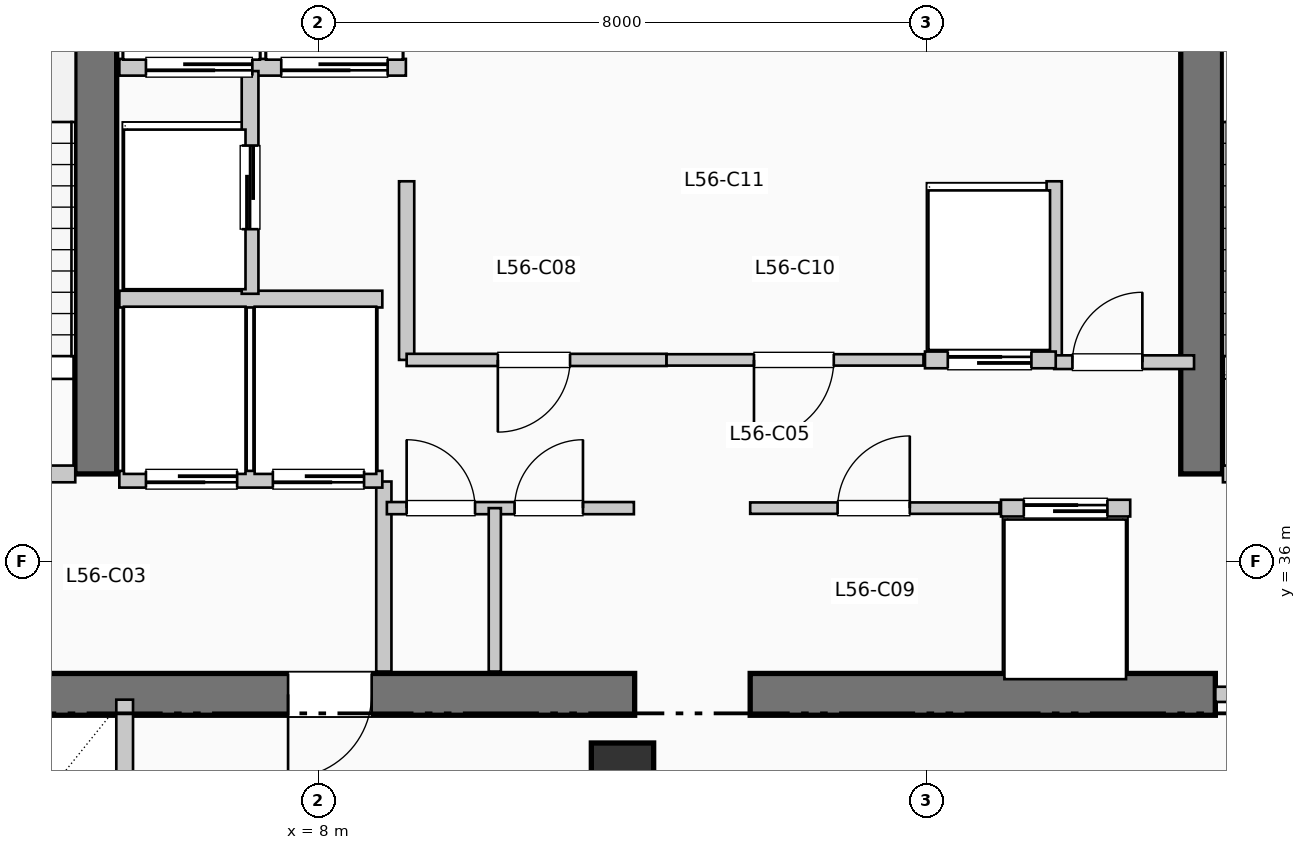
"""IFC4 building model, lengths in metres.
Left out: names, types, materials, properties, quantities, classifications, styles, units other than length and angle.
Written with IfcOpenShell. Run it as: python <this file> out.ifc"""

import sys

from ifc_helpers import new_model, si_unit, direction, frame, frame_2d, origin, origin_2d, place, context, subcontext, project, spatial, rectangle, extrude, element, fill, save


model = new_model("IFC4")
c1 = context("Model", 3, precision=1e-05, world=origin(), true_north=direction((0.0, 1.0)))
c2 = subcontext(c1, "Body", "Model", "MODEL_VIEW")
j1 = project(units=[si_unit("LENGTHUNIT", "METRE"), si_unit("PLANEANGLEUNIT", "RADIAN")], contexts=[c1])
p1 = place(None, origin())
s1 = spatial("IfcSite", under=j1, at=p1, CompositionType="ELEMENT")
p2 = place(p1, origin())
s2 = spatial("IfcBuilding", under=s1, at=p2, CompositionType="ELEMENT")
p3 = place(p2, frame((0.0, 0.0, 231.66)))
s3 = spatial("IfcBuildingStorey", under=s2, at=p3, CompositionType="ELEMENT", Elevation=231.66)
p4 = place(p3, frame((1.45, 34.25, 0.0), z_axis=(0.0, 0.0, 1.0), x_axis=(1.0, 0.0, 0.0)))
e1 = element("IfcWall", 1, at=p4, inside=s3, PredefinedType="SHEAR", context=c2, shape_type="SweptSolid", body=[
    extrude(rectangle(XDim=10.71, YDim=0.55, at=frame_2d((5.355, 0.0))), origin(), (0.0, 0.0, 1.0), 3.96),
])
p5 = place(p4, frame((7.25, 0.0, 0.0), z_axis=(0.0, 0.0, 1.0), x_axis=(-1.0, 0.0, 0.0)))
e2 = element("IfcOpeningElement", 2, at=p5, cuts=e1, PredefinedType="OPENING", context=c2, shape_type="SweptSolid", body=[
    extrude(rectangle(XDim=1.1, YDim=2.15, at=frame_2d((0.55, 1.075))), frame((0.0, 0.285, 0.0), z_axis=(0.0, -1.0, 0.0), x_axis=(1.0, 0.0, 0.0)), (0.0, 0.0, 1.0), 0.57),
])
p6 = place(p3, frame((13.68, 34.25, 0.0), z_axis=(0.0, 0.0, 1.0), x_axis=(1.0, 0.0, 0.0)))
e3 = element("IfcWall", 3, at=p6, inside=s3, PredefinedType="SHEAR", context=c2, shape_type="SweptSolid", body=[
    extrude(rectangle(XDim=6.12, YDim=0.55, at=frame_2d((3.06, 0.0))), origin(), (0.0, 0.0, 1.0), 3.96),
])
for number, where, z_axis, x_axis in (
    (4, (5.07, 37.15, 0.0), (0.0, 0.0, 1.0), (0.0, 1.0, 0.0)),
    (5, (19.62, 37.15, 0.0), (0.0, 0.0, 1.0), (0.0, 1.0, 0.0)),
):
    element("IfcWall", number, at=place(p3, frame(where, z_axis=z_axis, x_axis=x_axis)), inside=s3, PredefinedType="SHEAR", context=c2, shape_type="SweptSolid", body=[
        extrude(rectangle(XDim=7.89, YDim=0.55, at=frame_2d((3.945, 0.0))), origin(), (0.0, 0.0, 1.0), 3.96),
    ])
p7 = place(p3, frame((12.0, 33.2, 0.0), z_axis=(0.0, 0.0, 1.0), x_axis=(1.0, 0.0, 0.0)))
e6 = element("IfcColumn", 6, at=p7, inside=s3, PredefinedType="COLUMN", context=c2, shape_type="SweptSolid", body=[
    extrude(rectangle(XDim=0.82, YDim=0.82, at=origin_2d()), origin(), (0.0, 0.0, 1.0), 3.96),
])
p8 = place(p3, frame((1.65, 37.15, 0.0), z_axis=(0.0, 0.0, 1.0), x_axis=(1.0, 0.0, 0.0)))
e7 = element("IfcWall", 7, at=p8, inside=s3, PredefinedType="PARTITIONING", context=c2, shape_type="SweptSolid", body=[
    extrude(rectangle(XDim=3.15, YDim=0.22, at=frame_2d((1.575, 0.0))), origin(), (0.0, 0.0, 1.0), 3.71),
])
p9 = place(p8, frame((2.05, 0.0, 0.0), z_axis=(0.0, 0.0, 1.0), x_axis=(-1.0, 0.0, 0.0)))
e8 = element("IfcOpeningElement", 8, at=p9, cuts=e7, PredefinedType="OPENING", context=c2, shape_type="SweptSolid", body=[
    extrude(rectangle(XDim=1.05, YDim=2.15, at=frame_2d((0.525, 1.075))), frame((0.0, 0.12, 0.0), z_axis=(0.0, -1.0, 0.0), x_axis=(1.0, 0.0, 0.0)), (0.0, 0.0, 1.0), 0.24),
])
p10 = place(p3, frame((8.86, 34.55, 0.0), z_axis=(0.0, 0.0, 1.0), x_axis=(0.0, 1.0, 0.0)))
e9 = element("IfcWall", 9, at=p10, inside=s3, PredefinedType="PARTITIONING", context=c2, shape_type="SweptSolid", body=[
    extrude(rectangle(XDim=2.5, YDim=0.2, at=frame_2d((1.25, 0.0))), origin(), (0.0, 0.0, 1.0), 3.71),
])
p11 = place(p3, frame((19.9, 37.15, 0.0), z_axis=(0.0, 0.0, 1.0), x_axis=(1.0, 0.0, 0.0)))
e10 = element("IfcWall", 10, at=p11, inside=s3, PredefinedType="PARTITIONING", context=c2, shape_type="SweptSolid", body=[
    extrude(rectangle(XDim=3.15, YDim=0.22, at=frame_2d((1.575, 0.0))), origin(), (0.0, 0.0, 1.0), 3.71),
])
p12 = place(p11, frame((2.05, 0.0, 0.0), z_axis=(0.0, 0.0, 1.0), x_axis=(-1.0, 0.0, 0.0)))
e11 = element("IfcOpeningElement", 11, at=p12, cuts=e10, PredefinedType="OPENING", context=c2, shape_type="SweptSolid", body=[
    extrude(rectangle(XDim=1.05, YDim=2.15, at=frame_2d((0.525, 1.075))), frame((0.0, 0.12, 0.0), z_axis=(0.0, -1.0, 0.0), x_axis=(1.0, 0.0, 0.0)), (0.0, 0.0, 1.0), 0.24),
])
p13 = place(p3, frame((19.8, 34.25, 0.0), z_axis=(0.0, 0.0, 1.0), x_axis=(1.0, 0.0, 0.0)))
e12 = element("IfcWall", 12, at=p13, inside=s3, PredefinedType="PARTITIONING", context=c2, shape_type="SweptSolid", body=[
    extrude(rectangle(XDim=3.25, YDim=0.2, at=frame_2d((1.625, 0.0))), origin(), (0.0, 0.0, 1.0), 3.71),
])
p14 = place(p13, frame((2.15, 0.0, 0.0), z_axis=(0.0, 0.0, 1.0), x_axis=(-1.0, 0.0, 0.0)))
e13 = element("IfcOpeningElement", 13, at=p14, cuts=e12, PredefinedType="OPENING", context=c2, shape_type="SweptSolid", body=[
    extrude(rectangle(XDim=1.1, YDim=2.15, at=frame_2d((0.55, 1.075))), frame((0.0, 0.11, 0.0), z_axis=(0.0, -1.0, 0.0), x_axis=(1.0, 0.0, 0.0)), (0.0, 0.0, 1.0), 0.22),
])
p15 = place(p3, frame((5.38, 37.08, 0.0), z_axis=(0.0, 0.0, 1.0), x_axis=(1.0, 0.0, 0.0)))
e14 = element("IfcWall", 14, at=p15, inside=s3, PredefinedType="PARTITIONING", context=c2, shape_type="SweptSolid", body=[
    extrude(rectangle(XDim=3.46, YDim=0.22, at=frame_2d((1.73, 0.0))), origin(), (0.0, 0.0, 1.0), 3.71),
])
p16 = place(p15, frame((1.55, 0.0, 0.0), z_axis=(0.0, 0.0, 1.0), x_axis=(-1.0, 0.0, 0.0)))
e15 = element("IfcOpeningElement", 15, at=p16, cuts=e14, PredefinedType="OPENING", context=c2, shape_type="SweptSolid", body=[
    extrude(rectangle(XDim=1.2, YDim=2.2, at=frame_2d((0.6, 1.1))), frame((0.0, 0.12, 0.0), z_axis=(0.0, -1.0, 0.0), x_axis=(1.0, 0.0, 0.0)), (0.0, 0.0, 1.0), 0.24),
])
p17 = place(p15, frame((3.22, 0.0, 0.0), z_axis=(0.0, 0.0, 1.0), x_axis=(-1.0, 0.0, 0.0)))
e16 = element("IfcOpeningElement", 16, at=p17, cuts=e14, PredefinedType="OPENING", context=c2, shape_type="SweptSolid", body=[
    extrude(rectangle(XDim=1.2, YDim=2.2, at=frame_2d((0.6, 1.1))), frame((0.0, 0.12, 0.0), z_axis=(0.0, -1.0, 0.0), x_axis=(1.0, 0.0, 0.0)), (0.0, 0.0, 1.0), 0.24),
])
p18 = place(p3, frame((5.38, 39.45, 0.0), z_axis=(0.0, 0.0, 1.0), x_axis=(1.0, 0.0, 0.0)))
e17 = element("IfcWall", 17, at=p18, inside=s3, PredefinedType="PARTITIONING", context=c2, shape_type="SweptSolid", body=[
    extrude(rectangle(XDim=3.46, YDim=0.22, at=frame_2d((1.73, 0.0))), origin(), (0.0, 0.0, 1.0), 3.71),
])
p19 = place(p3, frame((5.38, 42.5, 0.0), z_axis=(0.0, 0.0, 1.0), x_axis=(1.0, 0.0, 0.0)))
e18 = element("IfcWall", 18, at=p19, inside=s3, PredefinedType="PARTITIONING", context=c2, shape_type="SweptSolid", body=[
    extrude(rectangle(XDim=3.77, YDim=0.22, at=frame_2d((1.885, 0.0))), origin(), (0.0, 0.0, 1.0), 3.71),
])
p20 = place(p19, frame((1.75, 0.0, 0.0), z_axis=(0.0, 0.0, 1.0), x_axis=(-1.0, 0.0, 0.0)))
e19 = element("IfcOpeningElement", 19, at=p20, cuts=e18, PredefinedType="OPENING", context=c2, shape_type="SweptSolid", body=[
    extrude(rectangle(XDim=1.4, YDim=2.2, at=frame_2d((0.7, 1.1))), frame((0.0, 0.12, 0.0), z_axis=(0.0, -1.0, 0.0), x_axis=(1.0, 0.0, 0.0)), (0.0, 0.0, 1.0), 0.24),
])
p21 = place(p19, frame((3.53, 0.0, 0.0), z_axis=(0.0, 0.0, 1.0), x_axis=(-1.0, 0.0, 0.0)))
e20 = element("IfcOpeningElement", 20, at=p21, cuts=e18, PredefinedType="OPENING", context=c2, shape_type="SweptSolid", body=[
    extrude(rectangle(XDim=1.4, YDim=2.2, at=frame_2d((0.7, 1.1))), frame((0.0, 0.12, 0.0), z_axis=(0.0, -1.0, 0.0), x_axis=(1.0, 0.0, 0.0)), (0.0, 0.0, 1.0), 0.24),
])
p22 = place(p3, frame((7.1, 39.52, 0.0), z_axis=(0.0, 0.0, 1.0), x_axis=(0.0, 1.0, 0.0)))
e21 = element("IfcWall", 21, at=p22, inside=s3, PredefinedType="PARTITIONING", context=c2, shape_type="SweptSolid", body=[
    extrude(rectangle(XDim=2.93, YDim=0.22, at=frame_2d((1.465, 0.0))), origin(), (0.0, 0.0, 1.0), 3.71),
])
p23 = place(p22, frame((0.85, 0.0, 0.0)))
e22 = element("IfcOpeningElement", 22, at=p23, cuts=e21, PredefinedType="OPENING", context=c2, shape_type="SweptSolid", body=[
    extrude(rectangle(XDim=1.1, YDim=2.2, at=frame_2d((0.55, 1.1))), frame((0.0, 0.12, 0.0), z_axis=(0.0, -1.0, 0.0), x_axis=(1.0, 0.0, 0.0)), (0.0, 0.0, 1.0), 0.24),
])
p24 = place(p3, frame((5.45, 31.8, 0.0), z_axis=(0.0, 0.0, 1.0), x_axis=(0.0, 1.0, 0.0)))
e23 = element("IfcWall", 23, at=p24, inside=s3, PredefinedType="PARTITIONING", context=c2, shape_type="SweptSolid", body=[
    extrude(rectangle(XDim=2.38, YDim=0.22, at=frame_2d((1.19, 0.0))), origin(), (0.0, 0.0, 1.0), 3.71),
])
for number, where, z_axis, x_axis in (
    (24, (9.16, 38.65, 0.0), (0.0, 0.0, 1.0), (0.0, 1.0, 0.0)),
    (25, (17.68, 38.65, 0.0), (0.0, 0.0, 1.0), (0.0, 1.0, 0.0)),
):
    element("IfcWall", number, at=place(p3, frame(where, z_axis=z_axis, x_axis=x_axis)), inside=s3, PredefinedType="PARTITIONING", context=c2, shape_type="SweptSolid", body=[
        extrude(rectangle(XDim=2.35, YDim=0.2, at=frame_2d((1.175, 0.0))), origin(), (0.0, 0.0, 1.0), 3.71),
    ])
p25 = place(p3, frame((17.68, 38.62, 0.0), z_axis=(0.0, 0.0, 1.0), x_axis=(1.0, 0.0, 0.0)))
e26 = element("IfcWall", 26, at=p25, inside=s3, PredefinedType="PARTITIONING", context=c2, shape_type="SweptSolid", body=[
    extrude(rectangle(XDim=1.84, YDim=0.18, at=frame_2d((0.92, 0.0))), origin(), (0.0, 0.0, 1.0), 3.71),
])
p26 = place(p25, frame((0.24, 0.0, 0.0)))
e27 = element("IfcOpeningElement", 27, at=p26, cuts=e26, PredefinedType="OPENING", context=c2, shape_type="SweptSolid", body=[
    extrude(rectangle(XDim=0.92, YDim=2.1, at=frame_2d((0.46, 1.05))), frame((0.0, 0.1, 0.0), z_axis=(0.0, -1.0, 0.0), x_axis=(1.0, 0.0, 0.0)), (0.0, 0.0, 1.0), 0.2),
])
p27 = place(p3, frame((8.9, 36.7, 0.0), z_axis=(0.0, 0.0, 1.0), x_axis=(1.0, 0.0, 0.0)))
e28 = element("IfcWall", 28, at=p27, inside=s3, PredefinedType="PARTITIONING", context=c2, shape_type="SweptSolid", body=[
    extrude(rectangle(XDim=3.25, YDim=0.16, at=frame_2d((1.625, 0.0))), origin(), (0.0, 0.0, 1.0), 3.71),
])
p28 = place(p27, frame((0.26, 0.0, 0.0)))
e29 = element("IfcOpeningElement", 29, at=p28, cuts=e28, PredefinedType="OPENING", context=c2, shape_type="SweptSolid", body=[
    extrude(rectangle(XDim=0.9, YDim=2.15, at=frame_2d((0.45, 1.075))), frame((0.0, 0.09, 0.0), z_axis=(0.0, -1.0, 0.0), x_axis=(1.0, 0.0, 0.0)), (0.0, 0.0, 1.0), 0.18),
])
p29 = place(p27, frame((1.68, 0.0, 0.0)))
e30 = element("IfcOpeningElement", 30, at=p29, cuts=e28, PredefinedType="OPENING", context=c2, shape_type="SweptSolid", body=[
    extrude(rectangle(XDim=0.9, YDim=2.15, at=frame_2d((0.45, 1.075))), frame((0.0, 0.09, 0.0), z_axis=(0.0, -1.0, 0.0), x_axis=(1.0, 0.0, 0.0)), (0.0, 0.0, 1.0), 0.18),
])
p30 = place(p3, frame((10.32, 34.55, 0.0), z_axis=(0.0, 0.0, 1.0), x_axis=(0.0, 1.0, 0.0)))
e31 = element("IfcWall", 31, at=p30, inside=s3, PredefinedType="PARTITIONING", context=c2, shape_type="SweptSolid", body=[
    extrude(rectangle(XDim=2.15, YDim=0.16, at=frame_2d((1.075, 0.0))), origin(), (0.0, 0.0, 1.0), 3.71),
])
p31 = place(p3, frame((9.16, 38.65, 0.0), z_axis=(0.0, 0.0, 1.0), x_axis=(1.0, 0.0, 0.0)))
e32 = element("IfcWall", 32, at=p31, inside=s3, PredefinedType="PARTITIONING", context=c2, shape_type="SweptSolid", body=[
    extrude(rectangle(XDim=3.42, YDim=0.16, at=frame_2d((1.71, 0.0))), origin(), (0.0, 0.0, 1.0), 3.71),
])
p32 = place(p31, frame((2.15, 0.0, 0.0), z_axis=(0.0, 0.0, 1.0), x_axis=(-1.0, 0.0, 0.0)))
e33 = element("IfcOpeningElement", 33, at=p32, cuts=e32, PredefinedType="OPENING", context=c2, shape_type="SweptSolid", body=[
    extrude(rectangle(XDim=0.95, YDim=2.15, at=frame_2d((0.475, 1.075))), frame((0.0, 0.09, 0.0), z_axis=(0.0, -1.0, 0.0), x_axis=(1.0, 0.0, 0.0)), (0.0, 0.0, 1.0), 0.18),
])
p33 = place(p3, frame((13.68, 36.7, 0.0), z_axis=(0.0, 0.0, 1.0), x_axis=(1.0, 0.0, 0.0)))
e34 = element("IfcWall", 34, at=p33, inside=s3, PredefinedType="PARTITIONING", context=c2, shape_type="SweptSolid", body=[
    extrude(rectangle(XDim=3.28, YDim=0.15, at=frame_2d((1.64, 0.0))), origin(), (0.0, 0.0, 1.0), 3.71),
])
p34 = place(p33, frame((1.15, 0.0, 0.0)))
e35 = element("IfcOpeningElement", 35, at=p34, cuts=e34, PredefinedType="OPENING", context=c2, shape_type="SweptSolid", body=[
    extrude(rectangle(XDim=0.95, YDim=2.15, at=frame_2d((0.475, 1.075))), frame((0.0, 0.085, 0.0), z_axis=(0.0, -1.0, 0.0), x_axis=(1.0, 0.0, 0.0)), (0.0, 0.0, 1.0), 0.17),
])
p35 = place(p3, frame((12.58, 38.65, 0.0), z_axis=(0.0, 0.0, 1.0), x_axis=(1.0, 0.0, 0.0)))
e36 = element("IfcWall", 36, at=p35, inside=s3, PredefinedType="PARTITIONING", context=c2, shape_type="SweptSolid", body=[
    extrude(rectangle(XDim=3.38, YDim=0.15, at=frame_2d((1.69, 0.0))), origin(), (0.0, 0.0, 1.0), 3.71),
])
p36 = place(p35, frame((2.2, 0.0, 0.0), z_axis=(0.0, 0.0, 1.0), x_axis=(-1.0, 0.0, 0.0)))
e37 = element("IfcOpeningElement", 37, at=p36, cuts=e36, PredefinedType="OPENING", context=c2, shape_type="SweptSolid", body=[
    extrude(rectangle(XDim=1.05, YDim=2.15, at=frame_2d((0.525, 1.075))), frame((0.0, 0.085, 0.0), z_axis=(0.0, -1.0, 0.0), x_axis=(1.0, 0.0, 0.0)), (0.0, 0.0, 1.0), 0.17),
])
p37 = place(p3, frame((16.98, 36.7, 0.0), z_axis=(0.0, 0.0, 1.0), x_axis=(1.0, 0.0, 0.0)))
e38 = element("IfcWall", 38, at=p37, inside=s3, PredefinedType="PARTITIONING", context=c2, shape_type="SweptSolid", body=[
    extrude(rectangle(XDim=1.7, YDim=0.22, at=frame_2d((0.85, 0.0))), origin(), (0.0, 0.0, 1.0), 3.71),
])
p38 = place(p37, frame((0.3, 0.0, 0.0)))
e39 = element("IfcOpeningElement", 39, at=p38, cuts=e38, PredefinedType="OPENING", context=c2, shape_type="SweptSolid", body=[
    extrude(rectangle(XDim=1.1, YDim=2.2, at=frame_2d((0.55, 1.1))), frame((0.0, 0.12, 0.0), z_axis=(0.0, -1.0, 0.0), x_axis=(1.0, 0.0, 0.0)), (0.0, 0.0, 1.0), 0.24),
])
p39 = place(p3, frame((15.98, 38.65, 0.0), z_axis=(0.0, 0.0, 1.0), x_axis=(1.0, 0.0, 0.0)))
e40 = element("IfcWall", 40, at=p39, inside=s3, PredefinedType="PARTITIONING", context=c2, shape_type="SweptSolid", body=[
    extrude(rectangle(XDim=1.72, YDim=0.22, at=frame_2d((0.86, 0.0))), origin(), (0.0, 0.0, 1.0), 3.71),
])
p40 = place(p39, frame((0.3, 0.0, 0.0)))
e41 = element("IfcOpeningElement", 41, at=p40, cuts=e40, PredefinedType="OPENING", context=c2, shape_type="SweptSolid", body=[
    extrude(rectangle(XDim=1.1, YDim=2.2, at=frame_2d((0.55, 1.1))), frame((0.0, 0.12, 0.0), z_axis=(0.0, -1.0, 0.0), x_axis=(1.0, 0.0, 0.0)), (0.0, 0.0, 1.0), 0.24),
])
p41 = place(p5, origin())
e42 = element("IfcDoor", 42, at=p41, inside=s3, OperationType="SINGLE_SWING_LEFT", PredefinedType="DOOR", context=c2, shape_type="SweptSolid", body=[
    extrude(rectangle(XDim=1.1, YDim=2.15, at=frame_2d((0.55, 1.075))), frame((0.0, 0.025, 0.0), z_axis=(0.0, -1.0, 0.0), x_axis=(1.0, 0.0, 0.0)), (0.0, 0.0, 1.0), 0.05),
])
fill(e2, e42)
p42 = place(p16, origin())
e43 = element("IfcDoor", 43, at=p42, inside=s3, OperationType="SLIDING_TO_RIGHT", PredefinedType="DOOR", context=c2, shape_type="SweptSolid", body=[
    extrude(rectangle(XDim=1.2, YDim=2.2, at=frame_2d((0.6, 1.1))), frame((0.0, 0.025, 0.0), z_axis=(0.0, -1.0, 0.0), x_axis=(1.0, 0.0, 0.0)), (0.0, 0.0, 1.0), 0.05),
])
fill(e15, e43)
p43 = place(p17, origin())
e44 = element("IfcDoor", 44, at=p43, inside=s3, OperationType="SLIDING_TO_RIGHT", PredefinedType="DOOR", context=c2, shape_type="SweptSolid", body=[
    extrude(rectangle(XDim=1.2, YDim=2.2, at=frame_2d((0.6, 1.1))), frame((0.0, 0.025, 0.0), z_axis=(0.0, -1.0, 0.0), x_axis=(1.0, 0.0, 0.0)), (0.0, 0.0, 1.0), 0.05),
])
fill(e16, e44)
p44 = place(p20, origin())
e45 = element("IfcDoor", 45, at=p44, inside=s3, OperationType="SLIDING_TO_LEFT", PredefinedType="DOOR", context=c2, shape_type="SweptSolid", body=[
    extrude(rectangle(XDim=1.4, YDim=2.2, at=frame_2d((0.7, 1.1))), frame((0.0, 0.025, 0.0), z_axis=(0.0, -1.0, 0.0), x_axis=(1.0, 0.0, 0.0)), (0.0, 0.0, 1.0), 0.05),
])
fill(e19, e45)
p45 = place(p21, origin())
e46 = element("IfcDoor", 46, at=p45, inside=s3, OperationType="SLIDING_TO_LEFT", PredefinedType="DOOR", context=c2, shape_type="SweptSolid", body=[
    extrude(rectangle(XDim=1.4, YDim=2.2, at=frame_2d((0.7, 1.1))), frame((0.0, 0.025, 0.0), z_axis=(0.0, -1.0, 0.0), x_axis=(1.0, 0.0, 0.0)), (0.0, 0.0, 1.0), 0.05),
])
fill(e20, e46)
p46 = place(p23, origin())
e47 = element("IfcDoor", 47, at=p46, inside=s3, OperationType="SLIDING_TO_LEFT", PredefinedType="DOOR", context=c2, shape_type="SweptSolid", body=[
    extrude(rectangle(XDim=1.1, YDim=2.2, at=frame_2d((0.55, 1.1))), frame((0.0, 0.025, 0.0), z_axis=(0.0, -1.0, 0.0), x_axis=(1.0, 0.0, 0.0)), (0.0, 0.0, 1.0), 0.05),
])
fill(e22, e47)
p47 = place(p26, origin())
e48 = element("IfcDoor", 48, at=p47, inside=s3, OperationType="SINGLE_SWING_RIGHT", PredefinedType="DOOR", context=c2, shape_type="SweptSolid", body=[
    extrude(rectangle(XDim=0.92, YDim=2.1, at=frame_2d((0.46, 1.05))), frame((0.0, 0.025, 0.0), z_axis=(0.0, -1.0, 0.0), x_axis=(1.0, 0.0, 0.0)), (0.0, 0.0, 1.0), 0.05),
])
fill(e27, e48)
p48 = place(p28, origin())
e49 = element("IfcDoor", 49, at=p48, inside=s3, OperationType="SINGLE_SWING_LEFT", PredefinedType="DOOR", context=c2, shape_type="SweptSolid", body=[
    extrude(rectangle(XDim=0.9, YDim=2.15, at=frame_2d((0.45, 1.075))), frame((0.0, 0.025, 0.0), z_axis=(0.0, -1.0, 0.0), x_axis=(1.0, 0.0, 0.0)), (0.0, 0.0, 1.0), 0.05),
])
fill(e29, e49)
p49 = place(p29, origin())
e50 = element("IfcDoor", 50, at=p49, inside=s3, OperationType="SINGLE_SWING_RIGHT", PredefinedType="DOOR", context=c2, shape_type="SweptSolid", body=[
    extrude(rectangle(XDim=0.9, YDim=2.15, at=frame_2d((0.45, 1.075))), frame((0.0, 0.025, 0.0), z_axis=(0.0, -1.0, 0.0), x_axis=(1.0, 0.0, 0.0)), (0.0, 0.0, 1.0), 0.05),
])
fill(e30, e50)
p50 = place(p32, origin())
e51 = element("IfcDoor", 51, at=p50, inside=s3, OperationType="SINGLE_SWING_LEFT", PredefinedType="DOOR", context=c2, shape_type="SweptSolid", body=[
    extrude(rectangle(XDim=0.95, YDim=2.15, at=frame_2d((0.475, 1.075))), frame((0.0, 0.025, 0.0), z_axis=(0.0, -1.0, 0.0), x_axis=(1.0, 0.0, 0.0)), (0.0, 0.0, 1.0), 0.05),
])
fill(e33, e51)
p51 = place(p34, origin())
e52 = element("IfcDoor", 52, at=p51, inside=s3, OperationType="SINGLE_SWING_RIGHT", PredefinedType="DOOR", context=c2, shape_type="SweptSolid", body=[
    extrude(rectangle(XDim=0.95, YDim=2.15, at=frame_2d((0.475, 1.075))), frame((0.0, 0.025, 0.0), z_axis=(0.0, -1.0, 0.0), x_axis=(1.0, 0.0, 0.0)), (0.0, 0.0, 1.0), 0.05),
])
fill(e35, e52)
p52 = place(p36, origin())
e53 = element("IfcDoor", 53, at=p52, inside=s3, OperationType="SINGLE_SWING_LEFT", PredefinedType="DOOR", context=c2, shape_type="SweptSolid", body=[
    extrude(rectangle(XDim=1.05, YDim=2.15, at=frame_2d((0.525, 1.075))), frame((0.0, 0.025, 0.0), z_axis=(0.0, -1.0, 0.0), x_axis=(1.0, 0.0, 0.0)), (0.0, 0.0, 1.0), 0.05),
])
fill(e37, e53)
p53 = place(p38, origin())
e54 = element("IfcDoor", 54, at=p53, inside=s3, OperationType="SLIDING_TO_LEFT", PredefinedType="DOOR", context=c2, shape_type="SweptSolid", body=[
    extrude(rectangle(XDim=1.1, YDim=2.2, at=frame_2d((0.55, 1.1))), frame((0.0, 0.025, 0.0), z_axis=(0.0, -1.0, 0.0), x_axis=(1.0, 0.0, 0.0)), (0.0, 0.0, 1.0), 0.05),
])
fill(e39, e54)
p54 = place(p40, origin())
e55 = element("IfcDoor", 55, at=p54, inside=s3, OperationType="SLIDING_TO_LEFT", PredefinedType="DOOR", context=c2, shape_type="SweptSolid", body=[
    extrude(rectangle(XDim=1.1, YDim=2.2, at=frame_2d((0.55, 1.1))), frame((0.0, 0.025, 0.0), z_axis=(0.0, -1.0, 0.0), x_axis=(1.0, 0.0, 0.0)), (0.0, 0.0, 1.0), 0.05),
])
fill(e41, e55)
save(model, sys.argv[1])
